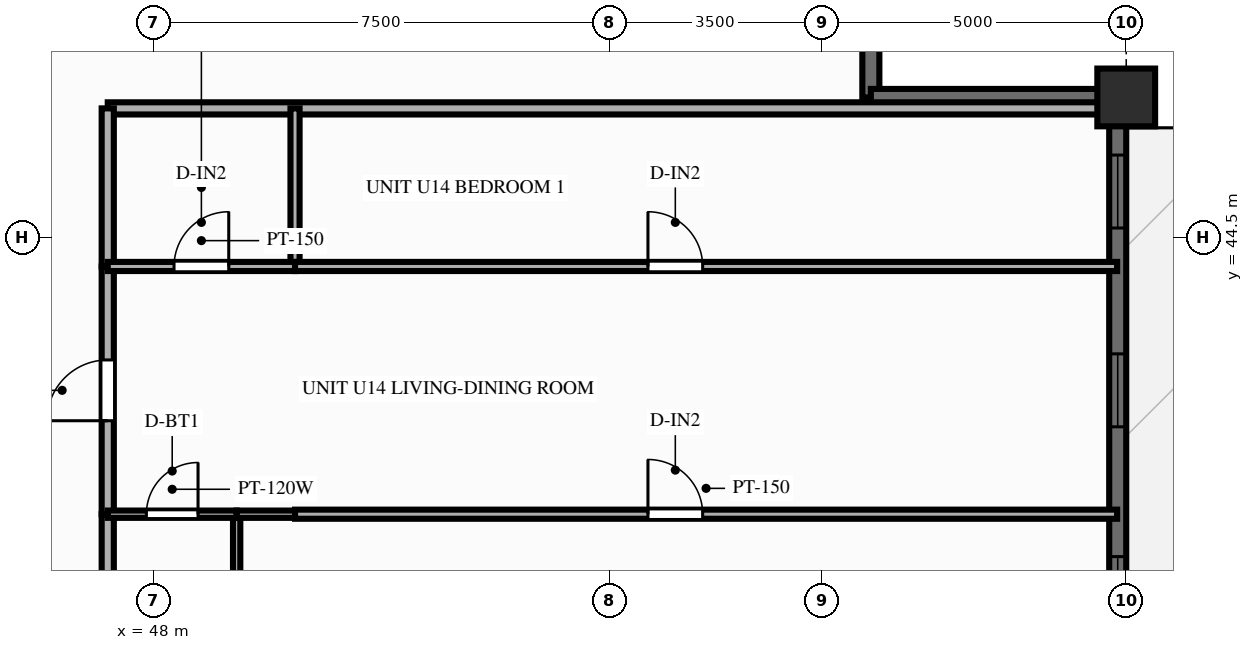
"""IFC4 building model, lengths in metres.
Left out: names, types, materials, properties, quantities, classifications, styles, units other than length and angle.
Written with IfcOpenShell. Run it as: python <this file> out.ifc"""

import sys

from ifc_helpers import new_model, si_unit, direction, frame, frame_2d, origin, origin_2d, place, context, subcontext, project, spatial, rectangle, extrude, source, transform, mapped, element, fill, save


model = new_model("IFC4")
c1 = context("Model", 3, precision=1e-05, world=origin(), true_north=direction((0.0, 1.0)))
c2 = subcontext(c1, "Body", "Model", "MODEL_VIEW")
j1 = project(units=[si_unit("LENGTHUNIT", "METRE"), si_unit("PLANEANGLEUNIT", "RADIAN")], contexts=[c1])
p1 = place(None, origin())
s1 = spatial("IfcSite", under=j1, at=p1, CompositionType="ELEMENT")
p2 = place(p1, origin())
s2 = spatial("IfcBuilding", under=s1, at=p2, CompositionType="ELEMENT")
p3 = place(p2, frame((0.0, 0.0, 113.85)))
s3 = spatial("IfcBuildingStorey", under=s2, at=p3, CompositionType="ELEMENT", Elevation=113.85)
m1 = source(origin(), c2, "Body", "SweptSolid", [
    extrude(rectangle(XDim=0.95, YDim=0.95, at=origin_2d()), origin(), (0.0, 0.0, 1.0), 3.0),
])
p4 = place(p3, frame((64.0, 46.8, 0.0), z_axis=(0.0, 0.0, 1.0), x_axis=(1.0, 0.0, 0.0)))
e1 = element("IfcColumn", 1, at=p4, inside=s3, PredefinedType="COLUMN", context=c2, shape_type="MappedRepresentation", body=[
    mapped(m1, transform((0.0, 0.0, 0.0), scale=1.0)),
])
p5 = place(p3, frame((63.86, 7.2, 0.0), z_axis=(0.0, 0.0, 1.0), x_axis=(0.0, 1.0, 0.0)))
e2 = element("IfcWall", 2, at=p5, inside=s3, PredefinedType="SOLIDWALL", context=c2, shape_type="SweptSolid", body=[
    extrude(rectangle(XDim=39.6, YDim=0.28, at=frame_2d((19.8, 0.0))), origin(), (0.0, 0.0, 1.0), 2.28),
])
p6 = place(p5, frame((1.56, 0.0, 0.25)))
e3 = element("IfcOpeningElement", 3, at=p6, cuts=e2, PredefinedType="OPENING", context=c2, shape_type="SweptSolid", body=[
    extrude(rectangle(XDim=1.2, YDim=1.5, at=frame_2d((0.6, 0.75))), frame((0.0, 0.152, 0.0), z_axis=(0.0, -1.0, 0.0), x_axis=(1.0, 0.0, 0.0)), (0.0, 0.0, 1.0), 0.304),
])
p7 = place(p5, frame((4.829, 0.0, 0.25)))
e4 = element("IfcOpeningElement", 4, at=p7, cuts=e2, PredefinedType="OPENING", context=c2, shape_type="SweptSolid", body=[
    extrude(rectangle(XDim=1.2, YDim=1.5, at=frame_2d((0.6, 0.75))), frame((0.0, 0.152, 0.0), z_axis=(0.0, -1.0, 0.0), x_axis=(1.0, 0.0, 0.0)), (0.0, 0.0, 1.0), 0.304),
])
p8 = place(p5, frame((7.567, 0.0, 0.25)))
e5 = element("IfcOpeningElement", 5, at=p8, cuts=e2, PredefinedType="OPENING", context=c2, shape_type="SweptSolid", body=[
    extrude(rectangle(XDim=1.2, YDim=1.5, at=frame_2d((0.6, 0.75))), frame((0.0, 0.152, 0.0), z_axis=(0.0, -1.0, 0.0), x_axis=(1.0, 0.0, 0.0)), (0.0, 0.0, 1.0), 0.304),
])
p9 = place(p5, frame((11.476, 0.0, 0.25)))
e6 = element("IfcOpeningElement", 6, at=p9, cuts=e2, PredefinedType="OPENING", context=c2, shape_type="SweptSolid", body=[
    extrude(rectangle(XDim=0.95, YDim=1.5, at=frame_2d((0.475, 0.75))), frame((0.0, 0.152, 0.0), z_axis=(0.0, -1.0, 0.0), x_axis=(1.0, 0.0, 0.0)), (0.0, 0.0, 1.0), 0.304),
])
p10 = place(p5, frame((13.552, 0.0, 0.25)))
e7 = element("IfcOpeningElement", 7, at=p10, cuts=e2, PredefinedType="OPENING", context=c2, shape_type="SweptSolid", body=[
    extrude(rectangle(XDim=1.2, YDim=1.5, at=frame_2d((0.6, 0.75))), frame((0.0, 0.152, 0.0), z_axis=(0.0, -1.0, 0.0), x_axis=(1.0, 0.0, 0.0)), (0.0, 0.0, 1.0), 0.304),
])
p11 = place(p5, frame((16.518, 0.0, 0.25)))
e8 = element("IfcOpeningElement", 8, at=p11, cuts=e2, PredefinedType="OPENING", context=c2, shape_type="SweptSolid", body=[
    extrude(rectangle(XDim=1.2, YDim=1.5, at=frame_2d((0.6, 0.75))), frame((0.0, 0.152, 0.0), z_axis=(0.0, -1.0, 0.0), x_axis=(1.0, 0.0, 0.0)), (0.0, 0.0, 1.0), 0.304),
])
p12 = place(p5, frame((19.2, 0.0, 0.25)))
e9 = element("IfcOpeningElement", 9, at=p12, cuts=e2, PredefinedType="OPENING", context=c2, shape_type="SweptSolid", body=[
    extrude(rectangle(XDim=1.2, YDim=1.5, at=frame_2d((0.6, 0.75))), frame((0.0, 0.152, 0.0), z_axis=(0.0, -1.0, 0.0), x_axis=(1.0, 0.0, 0.0)), (0.0, 0.0, 1.0), 0.304),
])
p13 = place(p5, frame((21.578, 0.0, 0.25)))
e10 = element("IfcOpeningElement", 10, at=p13, cuts=e2, PredefinedType="OPENING", context=c2, shape_type="SweptSolid", body=[
    extrude(rectangle(XDim=1.2, YDim=1.5, at=frame_2d((0.6, 0.75))), frame((0.0, 0.152, 0.0), z_axis=(0.0, -1.0, 0.0), x_axis=(1.0, 0.0, 0.0)), (0.0, 0.0, 1.0), 0.304),
])
p14 = place(p5, frame((26.313, 0.0, 0.0), z_axis=(0.0, 0.0, 1.0), x_axis=(-1.0, 0.0, 0.0)))
e11 = element("IfcOpeningElement", 11, at=p14, cuts=e2, PredefinedType="OPENING", context=c2, shape_type="SweptSolid", body=[
    extrude(rectangle(XDim=1.6, YDim=2.15, at=frame_2d((0.8, 1.075))), frame((0.0, 0.152, 0.0), z_axis=(0.0, -1.0, 0.0), x_axis=(1.0, 0.0, 0.0)), (0.0, 0.0, 1.0), 0.304),
])
p15 = place(p5, frame((29.305, 0.0, 0.25)))
e12 = element("IfcOpeningElement", 12, at=p15, cuts=e2, PredefinedType="OPENING", context=c2, shape_type="SweptSolid", body=[
    extrude(rectangle(XDim=0.7, YDim=1.5, at=frame_2d((0.35, 0.75))), frame((0.0, 0.152, 0.0), z_axis=(0.0, -1.0, 0.0), x_axis=(1.0, 0.0, 0.0)), (0.0, 0.0, 1.0), 0.304),
])
p16 = place(p5, frame((30.848, 0.0, 0.25)))
e13 = element("IfcOpeningElement", 13, at=p16, cuts=e2, PredefinedType="OPENING", context=c2, shape_type="SweptSolid", body=[
    extrude(rectangle(XDim=1.2, YDim=1.5, at=frame_2d((0.6, 0.75))), frame((0.0, 0.152, 0.0), z_axis=(0.0, -1.0, 0.0), x_axis=(1.0, 0.0, 0.0)), (0.0, 0.0, 1.0), 0.304),
])
p17 = place(p5, frame((34.183, 0.0, 0.25)))
e14 = element("IfcOpeningElement", 14, at=p17, cuts=e2, PredefinedType="OPENING", context=c2, shape_type="SweptSolid", body=[
    extrude(rectangle(XDim=1.2, YDim=1.5, at=frame_2d((0.6, 0.75))), frame((0.0, 0.152, 0.0), z_axis=(0.0, -1.0, 0.0), x_axis=(1.0, 0.0, 0.0)), (0.0, 0.0, 1.0), 0.304),
])
p18 = place(p5, frame((37.452, 0.0, 0.25)))
e15 = element("IfcOpeningElement", 15, at=p18, cuts=e2, PredefinedType="OPENING", context=c2, shape_type="SweptSolid", body=[
    extrude(rectangle(XDim=1.2, YDim=1.5, at=frame_2d((0.6, 0.75))), frame((0.0, 0.152, 0.0), z_axis=(0.0, -1.0, 0.0), x_axis=(1.0, 0.0, 0.0)), (0.0, 0.0, 1.0), 0.304),
])
for number, where, z_axis, x_axis in (
    (16, (59.8, 46.8, 0.0), (0.0, 0.0, 1.0), (0.0, 1.0, 0.0)),
    (17, (59.8, 46.8, 0.0), (0.0, 0.0, 1.0), (1.0, 0.0, 0.0)),
):
    element("IfcWall", number, at=place(p3, frame(where, z_axis=z_axis, x_axis=x_axis)), inside=s3, PredefinedType="SOLIDWALL", context=c2, shape_type="SweptSolid", body=[
        extrude(rectangle(XDim=4.12, YDim=0.28, at=frame_2d((2.06, 0.0))), origin(), (0.0, 0.0, 1.0), 2.28),
    ])
p19 = place(p3, frame((47.25, 46.62, 0.0), z_axis=(0.0, 0.0, 1.0), x_axis=(1.0, 0.0, 0.0)))
e18 = element("IfcWall", 18, at=p19, inside=s3, PredefinedType="PARTITIONING", context=c2, shape_type="SweptSolid", body=[
    extrude(rectangle(XDim=16.6, YDim=0.2, at=frame_2d((8.3, 0.0))), origin(), (0.0, 0.0, 1.0), 2.79),
])
p20 = place(p3, frame((47.25, 37.35, 0.0), z_axis=(0.0, 0.0, 1.0), x_axis=(0.0, 1.0, 0.0)))
e19 = element("IfcWall", 19, at=p20, inside=s3, PredefinedType="PARTITIONING", context=c2, shape_type="SweptSolid", body=[
    extrude(rectangle(XDim=2.595, YDim=0.2, at=frame_2d((1.298, 0.0))), origin(), (0.0, 0.0, 1.0), 2.79),
])
p21 = place(p3, frame((47.25, 39.946, 0.0), z_axis=(0.0, 0.0, 1.0), x_axis=(0.0, 1.0, 0.0)))
e20 = element("IfcWall", 20, at=p21, inside=s3, PredefinedType="PARTITIONING", context=c2, shape_type="SweptSolid", body=[
    extrude(rectangle(XDim=4.074, YDim=0.2, at=frame_2d((2.037, 0.0))), origin(), (0.0, 0.0, 1.0), 2.79),
])
p22 = place(p21, frame((1.537, 0.0, 0.0)))
e21 = element("IfcOpeningElement", 21, at=p22, cuts=e20, PredefinedType="OPENING", context=c2, shape_type="SweptSolid", body=[
    extrude(rectangle(XDim=1.0, YDim=2.15, at=frame_2d((0.5, 1.075))), frame((0.0, 0.112, 0.0), z_axis=(0.0, -1.0, 0.0), x_axis=(1.0, 0.0, 0.0)), (0.0, 0.0, 1.0), 0.224),
])
p23 = place(p3, frame((47.25, 44.02, 0.0), z_axis=(0.0, 0.0, 1.0), x_axis=(0.0, 1.0, 0.0)))
e22 = element("IfcWall", 22, at=p23, inside=s3, PredefinedType="PARTITIONING", context=c2, shape_type="SweptSolid", body=[
    extrude(rectangle(XDim=2.6, YDim=0.2, at=frame_2d((1.3, 0.0))), origin(), (0.0, 0.0, 1.0), 2.79),
])
p24 = place(p3, frame((49.37, 37.35, 0.0), z_axis=(0.0, 0.0, 1.0), x_axis=(0.0, 1.0, 0.0)))
e23 = element("IfcWall", 23, at=p24, inside=s3, PredefinedType="PARTITIONING", context=c2, shape_type="SweptSolid", body=[
    extrude(rectangle(XDim=2.595, YDim=0.12, at=frame_2d((1.298, 0.0))), origin(), (0.0, 0.0, 1.0), 2.79),
])
p25 = place(p3, frame((50.33, 44.02, 0.0), z_axis=(0.0, 0.0, 1.0), x_axis=(0.0, 1.0, 0.0)))
e24 = element("IfcWall", 24, at=p25, inside=s3, PredefinedType="PARTITIONING", context=c2, shape_type="SweptSolid", body=[
    extrude(rectangle(XDim=2.6, YDim=0.15, at=frame_2d((1.3, 0.0))), origin(), (0.0, 0.0, 1.0), 2.79),
])
p26 = place(p3, frame((47.25, 39.946, 0.0), z_axis=(0.0, 0.0, 1.0), x_axis=(1.0, 0.0, 0.0)))
e25 = element("IfcWall", 25, at=p26, inside=s3, PredefinedType="PARTITIONING", context=c2, shape_type="SweptSolid", body=[
    extrude(rectangle(XDim=2.12, YDim=0.12, at=frame_2d((1.06, 0.0))), origin(), (0.0, 0.0, 1.0), 2.79),
])
p27 = place(p26, frame((0.635, 0.0, 0.0)))
e26 = element("IfcOpeningElement", 26, at=p27, cuts=e25, PredefinedType="OPENING", context=c2, shape_type="SweptSolid", body=[
    extrude(rectangle(XDim=0.85, YDim=2.05, at=frame_2d((0.425, 1.025))), frame((0.0, 0.072, 0.0), z_axis=(0.0, -1.0, 0.0), x_axis=(1.0, 0.0, 0.0)), (0.0, 0.0, 1.0), 0.144),
])
p28 = place(p3, frame((49.37, 39.946, 0.0), z_axis=(0.0, 0.0, 1.0), x_axis=(1.0, 0.0, 0.0)))
e27 = element("IfcWall", 27, at=p28, inside=s3, PredefinedType="PARTITIONING", context=c2, shape_type="SweptSolid", body=[
    extrude(rectangle(XDim=0.96, YDim=0.12, at=frame_2d((0.48, 0.0))), origin(), (0.0, 0.0, 1.0), 2.79),
])
p29 = place(p3, frame((50.33, 39.946, 0.0), z_axis=(0.0, 0.0, 1.0), x_axis=(1.0, 0.0, 0.0)))
e28 = element("IfcWall", 28, at=p29, inside=s3, PredefinedType="PARTITIONING", context=c2, shape_type="SweptSolid", body=[
    extrude(rectangle(XDim=13.52, YDim=0.15, at=frame_2d((6.76, 0.0))), origin(), (0.0, 0.0, 1.0), 2.79),
])
p30 = place(p29, frame((5.804, 0.0, 0.0)))
e29 = element("IfcOpeningElement", 29, at=p30, cuts=e28, PredefinedType="OPENING", context=c2, shape_type="SweptSolid", body=[
    extrude(rectangle(XDim=0.9, YDim=2.1, at=frame_2d((0.45, 1.05))), frame((0.0, 0.087, 0.0), z_axis=(0.0, -1.0, 0.0), x_axis=(1.0, 0.0, 0.0)), (0.0, 0.0, 1.0), 0.174),
])
p31 = place(p3, frame((47.25, 44.02, 0.0), z_axis=(0.0, 0.0, 1.0), x_axis=(1.0, 0.0, 0.0)))
e30 = element("IfcWall", 30, at=p31, inside=s3, PredefinedType="PARTITIONING", context=c2, shape_type="SweptSolid", body=[
    extrude(rectangle(XDim=3.08, YDim=0.15, at=frame_2d((1.54, 0.0))), origin(), (0.0, 0.0, 1.0), 2.79),
])
p32 = place(p31, frame((1.09, 0.0, 0.0)))
e31 = element("IfcOpeningElement", 31, at=p32, cuts=e30, PredefinedType="OPENING", context=c2, shape_type="SweptSolid", body=[
    extrude(rectangle(XDim=0.9, YDim=2.1, at=frame_2d((0.45, 1.05))), frame((0.0, 0.087, 0.0), z_axis=(0.0, -1.0, 0.0), x_axis=(1.0, 0.0, 0.0)), (0.0, 0.0, 1.0), 0.174),
])
p33 = place(p3, frame((50.33, 44.02, 0.0), z_axis=(0.0, 0.0, 1.0), x_axis=(1.0, 0.0, 0.0)))
e32 = element("IfcWall", 32, at=p33, inside=s3, PredefinedType="PARTITIONING", context=c2, shape_type="SweptSolid", body=[
    extrude(rectangle(XDim=13.52, YDim=0.15, at=frame_2d((6.76, 0.0))), origin(), (0.0, 0.0, 1.0), 2.79),
])
p34 = place(p33, frame((5.804, 0.0, 0.0)))
e33 = element("IfcOpeningElement", 33, at=p34, cuts=e32, PredefinedType="OPENING", context=c2, shape_type="SweptSolid", body=[
    extrude(rectangle(XDim=0.9, YDim=2.1, at=frame_2d((0.45, 1.05))), frame((0.0, 0.087, 0.0), z_axis=(0.0, -1.0, 0.0), x_axis=(1.0, 0.0, 0.0)), (0.0, 0.0, 1.0), 0.174),
])
m2 = source(origin(), c2, "Body", "SweptSolid", [
    extrude(rectangle(XDim=1.2, YDim=1.5, at=frame_2d((0.6, 0.75))), frame((0.0, 0.03, 0.0), z_axis=(0.0, -1.0, 0.0), x_axis=(1.0, 0.0, 0.0)), (0.0, 0.0, 1.0), 0.06),
])
p35 = place(p16, origin())
e34 = element("IfcWindow", 34, at=p35, inside=s3, PartitioningType="SINGLE_PANEL", PredefinedType="WINDOW", context=c2, shape_type="MappedRepresentation", body=[
    mapped(m2, transform((0.0, 0.0, 0.0), scale=1.0)),
])
fill(e13, e34)
p36 = place(p17, origin())
e35 = element("IfcWindow", 35, at=p36, inside=s3, PartitioningType="SINGLE_PANEL", PredefinedType="WINDOW", context=c2, shape_type="MappedRepresentation", body=[
    mapped(m2, transform((0.0, 0.0, 0.0), scale=1.0)),
])
fill(e14, e35)
p37 = place(p18, origin())
e36 = element("IfcWindow", 36, at=p37, inside=s3, PartitioningType="SINGLE_PANEL", PredefinedType="WINDOW", context=c2, shape_type="MappedRepresentation", body=[
    mapped(m2, transform((0.0, 0.0, 0.0), scale=1.0)),
])
fill(e15, e36)
m3 = source(origin(), c2, "Body", "SweptSolid", [
    extrude(rectangle(XDim=1.0, YDim=2.15, at=frame_2d((0.5, 1.075))), frame((0.0, 0.025, 0.0), z_axis=(0.0, -1.0, 0.0), x_axis=(1.0, 0.0, 0.0)), (0.0, 0.0, 1.0), 0.05),
])
p38 = place(p22, origin())
e37 = element("IfcDoor", 37, at=p38, inside=s3, OperationType="SINGLE_SWING_LEFT", PredefinedType="DOOR", context=c2, shape_type="MappedRepresentation", body=[
    mapped(m3, transform((0.0, 0.0, 0.0), scale=1.0)),
])
fill(e21, e37)
m4 = source(origin(), c2, "Body", "SweptSolid", [
    extrude(rectangle(XDim=0.85, YDim=2.05, at=frame_2d((0.425, 1.025))), frame((0.0, 0.025, 0.0), z_axis=(0.0, -1.0, 0.0), x_axis=(1.0, 0.0, 0.0)), (0.0, 0.0, 1.0), 0.05),
])
p39 = place(p27, origin())
e38 = element("IfcDoor", 38, at=p39, inside=s3, OperationType="SINGLE_SWING_RIGHT", PredefinedType="DOOR", context=c2, shape_type="MappedRepresentation", body=[
    mapped(m4, transform((0.0, 0.0, 0.0), scale=1.0)),
])
fill(e26, e38)
m5 = source(origin(), c2, "Body", "SweptSolid", [
    extrude(rectangle(XDim=0.9, YDim=2.1, at=frame_2d((0.45, 1.05))), frame((0.0, 0.025, 0.0), z_axis=(0.0, -1.0, 0.0), x_axis=(1.0, 0.0, 0.0)), (0.0, 0.0, 1.0), 0.05),
])
p40 = place(p30, origin())
e39 = element("IfcDoor", 39, at=p40, inside=s3, OperationType="SINGLE_SWING_LEFT", PredefinedType="DOOR", context=c2, shape_type="MappedRepresentation", body=[
    mapped(m5, transform((0.0, 0.0, 0.0), scale=1.0)),
])
fill(e29, e39)
p41 = place(p32, origin())
e40 = element("IfcDoor", 40, at=p41, inside=s3, OperationType="SINGLE_SWING_RIGHT", PredefinedType="DOOR", context=c2, shape_type="MappedRepresentation", body=[
    mapped(m5, transform((0.0, 0.0, 0.0), scale=1.0)),
])
fill(e31, e40)
p42 = place(p34, origin())
e41 = element("IfcDoor", 41, at=p42, inside=s3, OperationType="SINGLE_SWING_LEFT", PredefinedType="DOOR", context=c2, shape_type="MappedRepresentation", body=[
    mapped(m5, transform((0.0, 0.0, 0.0), scale=1.0)),
])
fill(e33, e41)
save(model, sys.argv[1])
